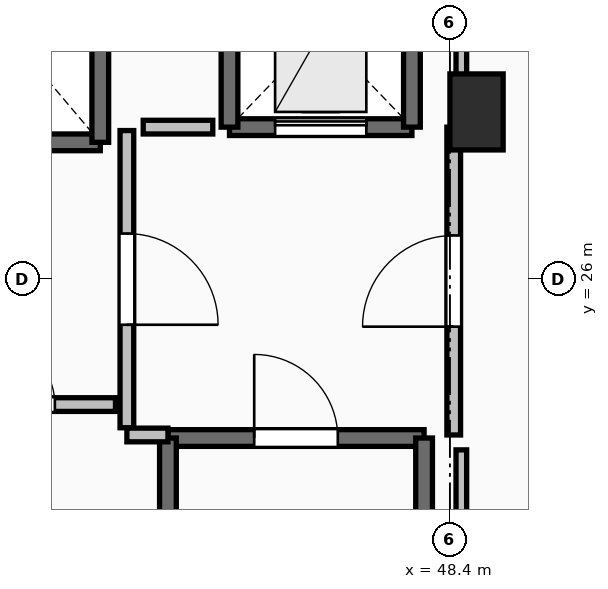
"""IFC4 building model, lengths in metres.
Left out: names, types, materials, properties, quantities, classifications, styles, units other than length and angle.
Written with IfcOpenShell. Run it as: python <this file> out.ifc"""

import sys

from ifc_helpers import new_model, si_unit, direction, frame, frame_2d, origin, origin_2d, place, context, subcontext, project, spatial, rectangle, extrude, element, fill, save


model = new_model("IFC4")
c1 = context("Model", 3, precision=1e-05, world=origin(), true_north=direction((0.0, 1.0)))
c2 = subcontext(c1, "Body", "Model", "MODEL_VIEW")
j1 = project(units=[si_unit("LENGTHUNIT", "METRE"), si_unit("PLANEANGLEUNIT", "RADIAN")], contexts=[c1])
p1 = place(None, origin())
s1 = spatial("IfcSite", under=j1, at=p1, CompositionType="ELEMENT")
p2 = place(p1, origin())
s2 = spatial("IfcBuilding", under=s1, at=p2, CompositionType="ELEMENT")
p3 = place(p2, frame((0.0, 0.0, 193.1)))
s3 = spatial("IfcBuildingStorey", under=s2, at=p3, CompositionType="ELEMENT", Elevation=193.1)
p4 = place(p3, frame((48.75, 28.2, 0.0), z_axis=(0.0, 0.0, 1.0), x_axis=(1.0, 0.0, 0.0)))
e1 = element("IfcColumn", 1, at=p4, inside=s3, PredefinedType="PILASTER", context=c2, shape_type="SweptSolid", body=[
    extrude(rectangle(XDim=0.7, YDim=1.0, at=origin_2d()), origin(), (0.0, 0.0, 1.0), 3.5),
])
p5 = place(p3, frame((44.69, 23.91, 0.0), z_axis=(0.0, 0.0, 1.0), x_axis=(1.0, 0.0, 0.0)))
e2 = element("IfcWall", 2, at=p5, inside=s3, PredefinedType="SOLIDWALL", context=c2, shape_type="SweptSolid", body=[
    extrude(rectangle(XDim=3.37, YDim=0.22, at=frame_2d((1.685, 0.0))), origin(), (0.0, 0.0, 1.0), 3.24),
])
p6 = place(p5, frame((1.135, 0.0, 0.0)))
e3 = element("IfcOpeningElement", 3, at=p6, cuts=e2, PredefinedType="OPENING", context=c2, shape_type="SweptSolid", body=[
    extrude(rectangle(XDim=1.1, YDim=2.15, at=frame_2d((0.55, 1.075))), frame((0.0, 0.125, 0.0), z_axis=(0.0, -1.0, 0.0), x_axis=(1.0, 0.0, 0.0)), (0.0, 0.0, 1.0), 0.25),
])
for number, where, z_axis, x_axis in (
    (4, (48.06, 23.91, 0.0), (0.0, 0.0, 1.0), (0.0, -1.0, 0.0)),
    (5, (44.69, 16.49, 0.0), (0.0, 0.0, 1.0), (0.0, 1.0, 0.0)),
):
    element("IfcWall", number, at=place(p3, frame(where, z_axis=z_axis, x_axis=x_axis)), inside=s3, PredefinedType="SOLIDWALL", context=c2, shape_type="SweptSolid", body=[
        extrude(rectangle(XDim=7.42, YDim=0.22, at=frame_2d((3.71, 0.0))), origin(), (0.0, 0.0, 1.0), 3.24),
    ])
p7 = place(p3, frame((41.6, 27.8, 0.0), z_axis=(0.0, 0.0, 1.0), x_axis=(1.0, 0.0, 0.0)))
e6 = element("IfcWall", 6, at=p7, inside=s3, PredefinedType="SOLIDWALL", context=c2, shape_type="SweptSolid", body=[
    extrude(rectangle(XDim=2.2, YDim=0.22, at=frame_2d((1.1, 0.0))), origin(), (0.0, 0.0, 1.0), 3.24),
])
p8 = place(p3, frame((43.8, 27.8, 0.0), z_axis=(0.0, 0.0, 1.0), x_axis=(0.0, 1.0, 0.0)))
e7 = element("IfcWall", 7, at=p8, inside=s3, PredefinedType="SOLIDWALL", context=c2, shape_type="SweptSolid", body=[
    extrude(rectangle(XDim=2.6, YDim=0.22, at=frame_2d((1.3, 0.0))), origin(), (0.0, 0.0, 1.0), 3.24),
])
p9 = place(p3, frame((45.5, 28.0, 0.0), z_axis=(0.0, 0.0, 1.0), x_axis=(1.0, 0.0, 0.0)))
e8 = element("IfcWall", 8, at=p9, inside=s3, PredefinedType="SHEAR", context=c2, shape_type="SweptSolid", body=[
    extrude(rectangle(XDim=2.4, YDim=0.22, at=frame_2d((1.2, 0.0))), origin(), (0.0, 0.0, 1.0), 3.24),
])
p10 = place(p9, frame((0.6, 0.0, 0.0)))
e9 = element("IfcOpeningElement", 9, at=p10, cuts=e8, PredefinedType="OPENING", context=c2, shape_type="SweptSolid", body=[
    extrude(rectangle(XDim=1.2, YDim=2.2, at=frame_2d((0.6, 1.1))), frame((0.0, 0.125, 0.0), z_axis=(0.0, -1.0, 0.0), x_axis=(1.0, 0.0, 0.0)), (0.0, 0.0, 1.0), 0.25),
])
for number, where, z_axis, x_axis in (
    (10, (47.9, 28.0, 0.0), (0.0, 0.0, 1.0), (0.0, 1.0, 0.0)),
    (11, (45.5, 30.5, 0.0), (0.0, 0.0, 1.0), (0.0, -1.0, 0.0)),
):
    element("IfcWall", number, at=place(p3, frame(where, z_axis=z_axis, x_axis=x_axis)), inside=s3, PredefinedType="SHEAR", context=c2, shape_type="SweptSolid", body=[
        extrude(rectangle(XDim=2.5, YDim=0.22, at=frame_2d((1.25, 0.0))), origin(), (0.0, 0.0, 1.0), 3.24),
    ])
p11 = place(p3, frame((44.15, 27.955, 0.0), z_axis=(0.0, 0.0, 1.0), x_axis=(0.0, -1.0, 0.0)))
e12 = element("IfcWall", 12, at=p11, inside=s3, PredefinedType="PARTITIONING", context=c2, shape_type="SweptSolid", body=[
    extrude(rectangle(XDim=3.91, YDim=0.18, at=frame_2d((1.955, 0.0))), origin(), (0.0, 0.0, 1.0), 3.24),
])
p12 = place(p11, frame((1.355, 0.0, 0.0)))
e13 = element("IfcOpeningElement", 13, at=p12, cuts=e12, PredefinedType="OPENING", context=c2, shape_type="SweptSolid", body=[
    extrude(rectangle(XDim=1.2, YDim=2.15, at=frame_2d((0.6, 1.075))), frame((0.0, 0.105, 0.0), z_axis=(0.0, -1.0, 0.0), x_axis=(1.0, 0.0, 0.0)), (0.0, 0.0, 1.0), 0.21),
])
p13 = place(p3, frame((44.15, 23.95, 0.0), z_axis=(0.0, 0.0, 1.0), x_axis=(1.0, 0.0, 0.0)))
e14 = element("IfcWall", 14, at=p13, inside=s3, PredefinedType="PARTITIONING", context=c2, shape_type="SweptSolid", body=[
    extrude(rectangle(XDim=0.54, YDim=0.18, at=frame_2d((0.27, 0.0))), origin(), (0.0, 0.0, 1.0), 3.24),
])
p14 = place(p3, frame((48.45, 23.95, 0.0), z_axis=(0.0, 0.0, 1.0), x_axis=(0.0, 1.0, 0.0)))
e15 = element("IfcWall", 15, at=p14, inside=s3, PredefinedType="PARTITIONING", context=c2, shape_type="SweptSolid", body=[
    extrude(rectangle(XDim=4.05, YDim=0.18, at=frame_2d((2.025, 0.0))), origin(), (0.0, 0.0, 1.0), 3.24),
])
p15 = place(p14, frame((1.425, 0.0, 0.0)))
e16 = element("IfcOpeningElement", 16, at=p15, cuts=e15, PredefinedType="OPENING", context=c2, shape_type="SweptSolid", body=[
    extrude(rectangle(XDim=1.2, YDim=2.15, at=frame_2d((0.6, 1.075))), frame((0.0, 0.105, 0.0), z_axis=(0.0, -1.0, 0.0), x_axis=(1.0, 0.0, 0.0)), (0.0, 0.0, 1.0), 0.21),
])
p16 = place(p3, frame((41.555, 24.35, 0.0), z_axis=(0.0, 0.0, 1.0), x_axis=(1.0, 0.0, 0.0)))
e17 = element("IfcWall", 17, at=p16, inside=s3, PredefinedType="PARTITIONING", context=c2, shape_type="SweptSolid", body=[
    extrude(rectangle(XDim=2.445, YDim=0.18, at=frame_2d((1.223, 0.0))), origin(), (0.0, 0.0, 1.0), 3.24),
])
p17 = place(p16, frame((0.798, 0.0, 0.0)))
e18 = element("IfcOpeningElement", 18, at=p17, cuts=e17, PredefinedType="OPENING", context=c2, shape_type="SweptSolid", body=[
    extrude(rectangle(XDim=0.85, YDim=2.1, at=frame_2d((0.425, 1.05))), frame((0.0, 0.105, 0.0), z_axis=(0.0, -1.0, 0.0), x_axis=(1.0, 0.0, 0.0)), (0.0, 0.0, 1.0), 0.21),
])
p18 = place(p3, frame((45.28, 28.0, 0.0), z_axis=(0.0, 0.0, 1.0), x_axis=(-1.0, 0.0, 0.0)))
e19 = element("IfcWall", 19, at=p18, inside=s3, PredefinedType="PARTITIONING", context=c2, shape_type="SweptSolid", body=[
    extrude(rectangle(XDim=0.915, YDim=0.18, at=frame_2d((0.458, 0.0))), origin(), (0.0, 0.0, 1.0), 3.24),
])
p19 = place(p3, frame((48.55, 16.24, 0.0), z_axis=(0.0, 0.0, 1.0), x_axis=(0.0, 1.0, 0.0)))
e20 = element("IfcWall", 20, at=p19, inside=s3, PredefinedType="PARTITIONING", context=c2, shape_type="SweptSolid", body=[
    extrude(rectangle(XDim=7.514, YDim=0.14, at=frame_2d((3.757, 0.0))), origin(), (0.0, 0.0, 1.0), 2.432),
])
p20 = place(p3, frame((48.55, 28.196, 0.0), z_axis=(0.0, 0.0, 1.0), x_axis=(0.0, 1.0, 0.0)))
e21 = element("IfcWall", 21, at=p20, inside=s3, PredefinedType="PARTITIONING", context=c2, shape_type="SweptSolid", body=[
    extrude(rectangle(XDim=5.254, YDim=0.14, at=frame_2d((2.627, 0.0))), origin(), (0.0, 0.0, 1.0), 2.432),
])
p21 = place(p6, origin())
e22 = element("IfcDoor", 22, at=p21, inside=s3, OperationType="SINGLE_SWING_LEFT", PredefinedType="DOOR", context=c2, shape_type="SweptSolid", body=[
    extrude(rectangle(XDim=1.1, YDim=2.15, at=frame_2d((0.55, 1.075))), frame((0.0, 0.025, 0.0), z_axis=(0.0, -1.0, 0.0), x_axis=(1.0, 0.0, 0.0)), (0.0, 0.0, 1.0), 0.05),
])
fill(e3, e22)
p22 = place(p10, origin())
e23 = element("IfcDoor", 23, at=p22, inside=s3, OperationType="SLIDING_TO_LEFT", PredefinedType="DOOR", context=c2, shape_type="SweptSolid", body=[
    extrude(rectangle(XDim=1.2, YDim=2.2, at=frame_2d((0.6, 1.1))), frame((0.0, 0.025, 0.0), z_axis=(0.0, -1.0, 0.0), x_axis=(1.0, 0.0, 0.0)), (0.0, 0.0, 1.0), 0.05),
])
fill(e9, e23)
p23 = place(p12, origin())
e24 = element("IfcDoor", 24, at=p23, inside=s3, OperationType="SINGLE_SWING_RIGHT", PredefinedType="DOOR", context=c2, shape_type="SweptSolid", body=[
    extrude(rectangle(XDim=1.2, YDim=2.15, at=frame_2d((0.6, 1.075))), frame((0.0, 0.025, 0.0), z_axis=(0.0, -1.0, 0.0), x_axis=(1.0, 0.0, 0.0)), (0.0, 0.0, 1.0), 0.05),
])
fill(e13, e24)
p24 = place(p15, origin())
e25 = element("IfcDoor", 25, at=p24, inside=s3, OperationType="SINGLE_SWING_LEFT", PredefinedType="DOOR", context=c2, shape_type="SweptSolid", body=[
    extrude(rectangle(XDim=1.2, YDim=2.15, at=frame_2d((0.6, 1.075))), frame((0.0, 0.025, 0.0), z_axis=(0.0, -1.0, 0.0), x_axis=(1.0, 0.0, 0.0)), (0.0, 0.0, 1.0), 0.05),
])
fill(e16, e25)
p25 = place(p17, origin())
e26 = element("IfcDoor", 26, at=p25, inside=s3, OperationType="SINGLE_SWING_LEFT", PredefinedType="DOOR", context=c2, shape_type="SweptSolid", body=[
    extrude(rectangle(XDim=0.85, YDim=2.1, at=frame_2d((0.425, 1.05))), frame((0.0, 0.025, 0.0), z_axis=(0.0, -1.0, 0.0), x_axis=(1.0, 0.0, 0.0)), (0.0, 0.0, 1.0), 0.05),
])
fill(e18, e26)
save(model, sys.argv[1])
